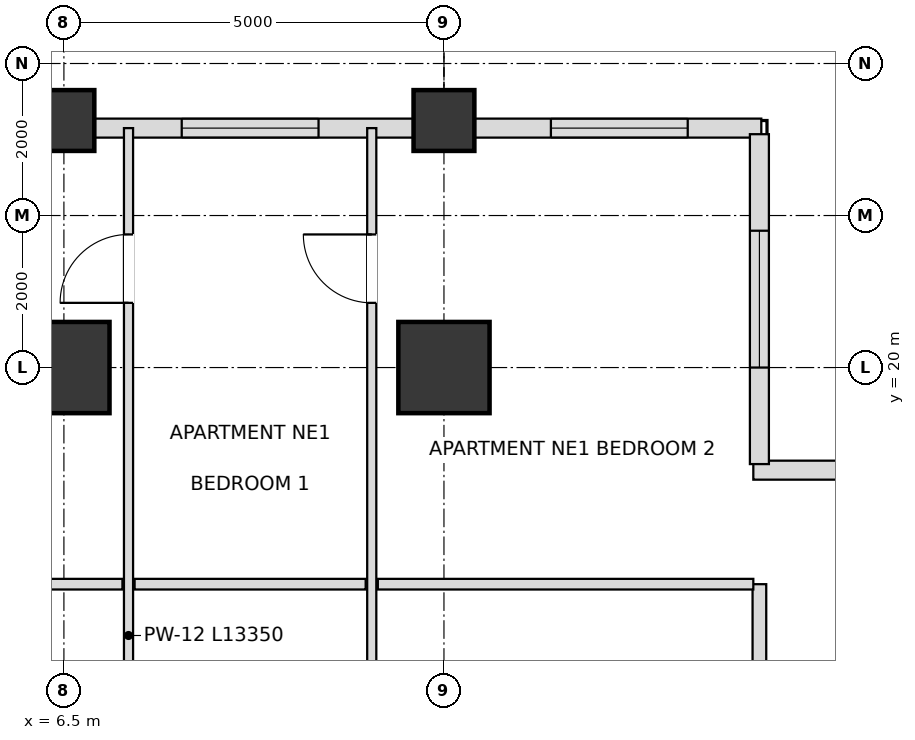
"""IFC4 building model, lengths in metres.
Left out: names, types, materials, properties, quantities, classifications, styles, units other than length and angle.
Written with IfcOpenShell. Run it as: python <this file> out.ifc"""

import sys

from ifc_helpers import new_model, si_unit, direction, frame, frame_2d, origin, origin_2d, place, context, subcontext, project, spatial, rectangle, extrude, element, fill, save


model = new_model("IFC4")
c1 = context("Model", 3, precision=1e-05, world=origin(), true_north=direction((0.0, 1.0)))
c2 = subcontext(c1, "Body", "Model", "MODEL_VIEW")
j1 = project(units=[si_unit("LENGTHUNIT", "METRE"), si_unit("PLANEANGLEUNIT", "RADIAN")], contexts=[c1])
p1 = place(None, origin())
s1 = spatial("IfcSite", under=j1, at=p1, CompositionType="ELEMENT")
p2 = place(p1, origin())
s2 = spatial("IfcBuilding", under=s1, at=p2, CompositionType="ELEMENT")
p3 = place(p2, frame((0.0, 0.0, 154.8)))
s3 = spatial("IfcBuildingStorey", under=s2, at=p3, CompositionType="ELEMENT", Elevation=154.8)
for number, where, z_axis, x_axis in (
    (1, (11.5, 20.0, 0.0), (0.0, 0.0, 1.0), (1.0, 0.0, 0.0)),
    (2, (6.5, 20.0, 0.0), (0.0, 0.0, 1.0), (1.0, 0.0, 0.0)),
):
    element("IfcColumn", number, at=place(p3, frame(where, z_axis=z_axis, x_axis=x_axis)), inside=s3, PredefinedType="USERDEFINED", context=c2, shape_type="SweptSolid", body=[
        extrude(rectangle(XDim=1.2, YDim=1.2, at=origin_2d()), origin(), (0.0, 0.0, 1.0), 3.6),
    ])
for number, where, z_axis, x_axis in (
    (3, (6.5, 23.25, 0.0), (0.0, 0.0, 1.0), (1.0, 0.0, 0.0)),
    (4, (11.5, 23.25, 0.0), (0.0, 0.0, 1.0), (1.0, 0.0, 0.0)),
):
    element("IfcColumn", number, at=place(p3, frame(where, z_axis=z_axis, x_axis=x_axis)), inside=s3, PredefinedType="COLUMN", context=c2, shape_type="SweptSolid", body=[
        extrude(rectangle(XDim=0.8, YDim=0.8, at=origin_2d()), origin(), (0.0, 0.0, 1.0), 3.6),
    ])
p4 = place(p3, frame((15.675, 23.15, 0.0), z_axis=(0.0, 0.0, 1.0), x_axis=(-1.0, 0.0, 0.0)))
e5 = element("IfcWall", 5, at=p4, inside=s3, PredefinedType="SOLIDWALL", context=c2, shape_type="SweptSolid", body=[
    extrude(rectangle(XDim=3.78, YDim=0.25, at=frame_2d((1.89, 0.0))), origin(), (0.0, 0.0, 1.0), 2.736),
])
p5 = place(p4, frame((0.968, 0.0, 0.72)))
e6 = element("IfcOpeningElement", 6, at=p5, cuts=e5, PredefinedType="OPENING", context=c2, shape_type="SweptSolid", body=[
    extrude(rectangle(XDim=1.8, YDim=1.68, at=frame_2d((0.9, 0.84))), frame((0.0, 0.135, 0.0), z_axis=(0.0, -1.0, 0.0), x_axis=(1.0, 0.0, 0.0)), (0.0, 0.0, 1.0), 0.27),
])
p6 = place(p3, frame((11.105, 23.15, 0.0), z_axis=(0.0, 0.0, 1.0), x_axis=(-1.0, 0.0, 0.0)))
e7 = element("IfcWall", 7, at=p6, inside=s3, PredefinedType="SOLIDWALL", context=c2, shape_type="SweptSolid", body=[
    extrude(rectangle(XDim=4.21, YDim=0.25, at=frame_2d((2.105, 0.0))), origin(), (0.0, 0.0, 1.0), 2.736),
])
p7 = place(p6, frame((1.255, 0.0, 0.72)))
e8 = element("IfcOpeningElement", 8, at=p7, cuts=e7, PredefinedType="OPENING", context=c2, shape_type="SweptSolid", body=[
    extrude(rectangle(XDim=1.8, YDim=1.68, at=frame_2d((0.9, 0.84))), frame((0.0, 0.135, 0.0), z_axis=(0.0, -1.0, 0.0), x_axis=(1.0, 0.0, 0.0)), (0.0, 0.0, 1.0), 0.27),
])
p8 = place(p3, frame((20.23, 18.65, 0.0), z_axis=(0.0, 0.0, 1.0), x_axis=(-1.0, 0.0, 0.0)))
e9 = element("IfcWall", 9, at=p8, inside=s3, PredefinedType="SOLIDWALL", context=c2, shape_type="SweptSolid", body=[
    extrude(rectangle(XDim=4.66, YDim=0.25, at=frame_2d((2.33, 0.0))), origin(), (0.0, 0.0, 1.0), 2.736),
])
p9 = place(p8, frame((1.43, 0.0, 0.72)))
e10 = element("IfcOpeningElement", 10, at=p9, cuts=e9, PredefinedType="OPENING", context=c2, shape_type="SweptSolid", body=[
    extrude(rectangle(XDim=1.8, YDim=1.68, at=frame_2d((0.9, 0.84))), frame((0.0, 0.135, 0.0), z_axis=(0.0, -1.0, 0.0), x_axis=(1.0, 0.0, 0.0)), (0.0, 0.0, 1.0), 0.27),
])
p10 = place(p3, frame((15.65, 18.73, 0.0), z_axis=(0.0, 0.0, 1.0), x_axis=(0.0, 1.0, 0.0)))
e11 = element("IfcWall", 11, at=p10, inside=s3, PredefinedType="SOLIDWALL", context=c2, shape_type="SweptSolid", body=[
    extrude(rectangle(XDim=4.34, YDim=0.25, at=frame_2d((2.17, 0.0))), origin(), (0.0, 0.0, 1.0), 2.736),
])
p11 = place(p10, frame((1.27, 0.0, 0.72)))
e12 = element("IfcOpeningElement", 12, at=p11, cuts=e11, PredefinedType="OPENING", context=c2, shape_type="SweptSolid", body=[
    extrude(rectangle(XDim=1.8, YDim=1.68, at=frame_2d((0.9, 0.84))), frame((0.0, 0.135, 0.0), z_axis=(0.0, -1.0, 0.0), x_axis=(1.0, 0.0, 0.0)), (0.0, 0.0, 1.0), 0.27),
])
p12 = place(p3, frame((7.35, 9.8, 0.0), z_axis=(0.0, 0.0, 1.0), x_axis=(0.0, 1.0, 0.0)))
e13 = element("IfcWall", 13, at=p12, inside=s3, PredefinedType="PARTITIONING", context=c2, shape_type="SweptSolid", body=[
    extrude(rectangle(XDim=13.35, YDim=0.12, at=frame_2d((6.675, 0.0))), origin(), (0.0, 0.0, 1.0), 2.816),
])
p13 = place(p12, frame((3.195, 0.0, 0.0)))
e14 = element("IfcOpeningElement", 14, at=p13, cuts=e13, PredefinedType="OPENING", context=c2, shape_type="SweptSolid", body=[
    extrude(rectangle(XDim=0.95, YDim=2.1, at=frame_2d((0.475, 1.05))), frame((0.0, 0.07, 0.0), z_axis=(0.0, -1.0, 0.0), x_axis=(1.0, 0.0, 0.0)), (0.0, 0.0, 1.0), 0.14),
])
p14 = place(p12, frame((11.051, 0.0, 0.0)))
e15 = element("IfcOpeningElement", 15, at=p14, cuts=e13, PredefinedType="OPENING", context=c2, shape_type="SweptSolid", body=[
    extrude(rectangle(XDim=0.9, YDim=2.1, at=frame_2d((0.45, 1.05))), frame((0.0, 0.07, 0.0), z_axis=(0.0, -1.0, 0.0), x_axis=(1.0, 0.0, 0.0)), (0.0, 0.0, 1.0), 0.14),
])
p15 = place(p3, frame((10.55, 9.8, 0.0), z_axis=(0.0, 0.0, 1.0), x_axis=(0.0, 1.0, 0.0)))
e16 = element("IfcWall", 16, at=p15, inside=s3, PredefinedType="PARTITIONING", context=c2, shape_type="SweptSolid", body=[
    extrude(rectangle(XDim=13.35, YDim=0.12, at=frame_2d((6.675, 0.0))), origin(), (0.0, 0.0, 1.0), 2.816),
])
p16 = place(p15, frame((3.713, 0.0, 0.0)))
e17 = element("IfcOpeningElement", 17, at=p16, cuts=e16, PredefinedType="OPENING", context=c2, shape_type="SweptSolid", body=[
    extrude(rectangle(XDim=0.95, YDim=2.1, at=frame_2d((0.475, 1.05))), frame((0.0, 0.07, 0.0), z_axis=(0.0, -1.0, 0.0), x_axis=(1.0, 0.0, 0.0)), (0.0, 0.0, 1.0), 0.14),
])
p17 = place(p15, frame((11.051, 0.0, 0.0)))
e18 = element("IfcOpeningElement", 18, at=p17, cuts=e16, PredefinedType="OPENING", context=c2, shape_type="SweptSolid", body=[
    extrude(rectangle(XDim=0.9, YDim=2.1, at=frame_2d((0.45, 1.05))), frame((0.0, 0.07, 0.0), z_axis=(0.0, -1.0, 0.0), x_axis=(1.0, 0.0, 0.0)), (0.0, 0.0, 1.0), 0.14),
])
p18 = place(p3, frame((15.65, 9.8, 0.0), z_axis=(0.0, 0.0, 1.0), x_axis=(0.0, 1.0, 0.0)))
e19 = element("IfcWall", 19, at=p18, inside=s3, PredefinedType="PARTITIONING", context=c2, shape_type="SweptSolid", body=[
    extrude(rectangle(XDim=7.35, YDim=0.18, at=frame_2d((3.675, 0.0))), origin(), (0.0, 0.0, 1.0), 2.736),
])
p19 = place(p3, frame((3.23, 17.15, 0.0), z_axis=(0.0, 0.0, 1.0), x_axis=(1.0, 0.0, 0.0)))
e20 = element("IfcWall", 20, at=p19, inside=s3, PredefinedType="PARTITIONING", context=c2, shape_type="SweptSolid", body=[
    extrude(rectangle(XDim=4.04, YDim=0.14, at=frame_2d((2.02, 0.0))), origin(), (0.0, 0.0, 1.0), 2.816),
])
p20 = place(p19, frame((1.545, 0.0, 0.0)))
e21 = element("IfcOpeningElement", 21, at=p20, cuts=e20, PredefinedType="OPENING", context=c2, shape_type="SweptSolid", body=[
    extrude(rectangle(XDim=0.95, YDim=2.1, at=frame_2d((0.475, 1.05))), frame((0.0, 0.08, 0.0), z_axis=(0.0, -1.0, 0.0), x_axis=(1.0, 0.0, 0.0)), (0.0, 0.0, 1.0), 0.16),
])
p21 = place(p3, frame((7.43, 17.15, 0.0), z_axis=(0.0, 0.0, 1.0), x_axis=(1.0, 0.0, 0.0)))
e22 = element("IfcWall", 22, at=p21, inside=s3, PredefinedType="PARTITIONING", context=c2, shape_type="SweptSolid", body=[
    extrude(rectangle(XDim=3.04, YDim=0.14, at=frame_2d((1.52, 0.0))), origin(), (0.0, 0.0, 1.0), 3.38),
])
p22 = place(p3, frame((10.63, 17.15, 0.0), z_axis=(0.0, 0.0, 1.0), x_axis=(1.0, 0.0, 0.0)))
e23 = element("IfcWall", 23, at=p22, inside=s3, PredefinedType="PARTITIONING", context=c2, shape_type="SweptSolid", body=[
    extrude(rectangle(XDim=4.94, YDim=0.14, at=frame_2d((2.47, 0.0))), origin(), (0.0, 0.0, 1.0), 2.736),
])
p23 = place(p5, origin())
e24 = element("IfcWindow", 24, at=p23, inside=s3, PartitioningType="SINGLE_PANEL", PredefinedType="WINDOW", context=c2, shape_type="SweptSolid", body=[
    extrude(rectangle(XDim=1.8, YDim=1.68, at=frame_2d((0.9, 0.84))), frame((0.0, 0.03, 0.0), z_axis=(0.0, -1.0, 0.0), x_axis=(1.0, 0.0, 0.0)), (0.0, 0.0, 1.0), 0.06),
])
fill(e6, e24)
p24 = place(p7, origin())
e25 = element("IfcWindow", 25, at=p24, inside=s3, PartitioningType="SINGLE_PANEL", PredefinedType="WINDOW", context=c2, shape_type="SweptSolid", body=[
    extrude(rectangle(XDim=1.8, YDim=1.68, at=frame_2d((0.9, 0.84))), frame((0.0, 0.03, 0.0), z_axis=(0.0, -1.0, 0.0), x_axis=(1.0, 0.0, 0.0)), (0.0, 0.0, 1.0), 0.06),
])
fill(e8, e25)
p25 = place(p11, origin())
e26 = element("IfcWindow", 26, at=p25, inside=s3, PartitioningType="SINGLE_PANEL", PredefinedType="WINDOW", context=c2, shape_type="SweptSolid", body=[
    extrude(rectangle(XDim=1.8, YDim=1.68, at=frame_2d((0.9, 0.84))), frame((0.0, 0.03, 0.0), z_axis=(0.0, -1.0, 0.0), x_axis=(1.0, 0.0, 0.0)), (0.0, 0.0, 1.0), 0.06),
])
fill(e12, e26)
p26 = place(p14, origin())
e27 = element("IfcDoor", 27, at=p26, inside=s3, OperationType="SINGLE_SWING_LEFT", PredefinedType="DOOR", context=c2, shape_type="SweptSolid", body=[
    extrude(rectangle(XDim=0.9, YDim=2.1, at=frame_2d((0.45, 1.05))), frame((0.0, 0.025, 0.0), z_axis=(0.0, -1.0, 0.0), x_axis=(1.0, 0.0, 0.0)), (0.0, 0.0, 1.0), 0.05),
])
fill(e15, e27)
p27 = place(p17, origin())
e28 = element("IfcDoor", 28, at=p27, inside=s3, OperationType="SINGLE_SWING_RIGHT", PredefinedType="DOOR", context=c2, shape_type="SweptSolid", body=[
    extrude(rectangle(XDim=0.9, YDim=2.1, at=frame_2d((0.45, 1.05))), frame((0.0, 0.025, 0.0), z_axis=(0.0, -1.0, 0.0), x_axis=(1.0, 0.0, 0.0)), (0.0, 0.0, 1.0), 0.05),
])
fill(e18, e28)
save(model, sys.argv[1])
